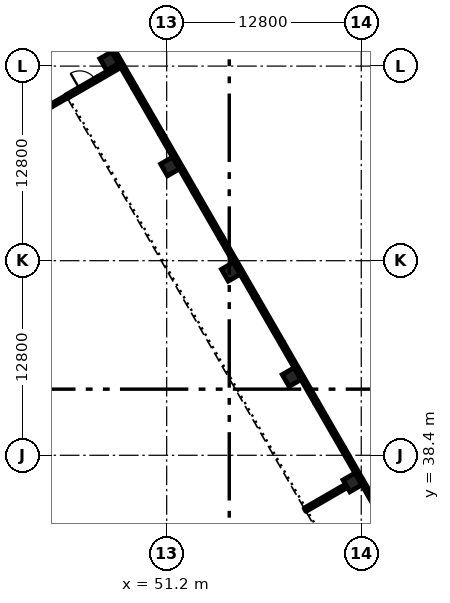
"""IFC4 building model, lengths in metres.
Left out: names, types, materials, properties, quantities, classifications, styles, units other than length and angle.
Written with IfcOpenShell. Run it as: python <this file> out.ifc"""

import sys

from ifc_helpers import new_model, si_unit, direction, frame, frame_2d, origin, origin_2d, place, context, subcontext, project, spatial, rectangle, extrude, element, fill, save


model = new_model("IFC4")
c1 = context("Model", 3, precision=1e-05, world=origin(), true_north=direction((0.0, 1.0)))
c2 = subcontext(c1, "Body", "Model", "MODEL_VIEW")
j1 = project(units=[si_unit("LENGTHUNIT", "METRE"), si_unit("PLANEANGLEUNIT", "RADIAN")], contexts=[c1])
p1 = place(None, origin())
s1 = spatial("IfcSite", under=j1, at=p1, CompositionType="ELEMENT")
p2 = place(p1, origin())
s2 = spatial("IfcBuilding", under=s1, at=p2, CompositionType="ELEMENT")
p3 = place(p2, frame((0.0, 0.0, 11.4)))
s3 = spatial("IfcBuildingStorey", under=s2, at=p3, CompositionType="ELEMENT", Elevation=11.4)
for number, where, z_axis, x_axis in (
    (1, (63.417, 36.614, 0.0), (0.0, 0.0, 1.0), (-0.5, 0.866, 0.0)),
    (2, (59.417, 43.542, 0.0), (0.0, 0.0, 1.0), (-0.5, 0.866, 0.0)),
    (3, (55.417, 50.47, 0.0), (0.0, 0.0, 1.0), (-0.5, 0.866, 0.0)),
    (4, (51.417, 57.399, 0.0), (0.0, 0.0, 1.0), (-0.5, 0.866, 0.0)),
    (5, (47.417, 64.327, 0.0), (0.0, 0.0, 1.0), (-0.5, 0.866, 0.0)),
):
    element("IfcColumn", number, at=place(p3, frame(where, z_axis=z_axis, x_axis=x_axis)), inside=s3, PredefinedType="COLUMN", context=c2, shape_type="SweptSolid", body=[
        extrude(rectangle(XDim=0.9, YDim=0.9, at=origin_2d()), origin(), (0.0, 0.0, 1.0), 4.8),
    ])
p4 = place(p2, frame((0.0, 0.0, 6.0)))
s4 = spatial("IfcBuildingStorey", under=s2, at=p4, CompositionType="ELEMENT", Elevation=6.0)
p5 = place(p4, frame((26.178, 15.114, 0.0), z_axis=(0.0, 0.0, 1.0), x_axis=(0.866025540551, 0.499999763114, 0.0)))
e6 = element("IfcWall", 6, at=p5, inside=s4, PredefinedType="SOLIDWALL", context=c2, shape_type="SweptSolid", body=[
    extrude(rectangle(XDim=39.4, YDim=0.25, at=frame_2d((19.7, 0.0))), origin(), (0.0, 0.0, 1.0), 10.2),
])
p6 = place(p3, frame((62.79, 38.85, 0.0), z_axis=(0.0, 0.0, 1.0), x_axis=(0.499990139034, -0.866031096941, 0.0)))
e7 = element("IfcWall", 7, at=p6, inside=s3, PredefinedType="SOLIDWALL", context=c2, shape_type="SweptSolid", body=[
    extrude(rectangle(XDim=4.5, YDim=0.25, at=frame_2d((2.25, 0.0))), origin(), (0.0, 0.0, 1.0), 4.5),
])
p7 = place(p3, frame((61.04, 41.881, 0.0), z_axis=(0.0, 0.0, 1.0), x_axis=(0.500010275428, -0.866019471182, 0.0)))
e8 = element("IfcWall", 8, at=p7, inside=s3, PredefinedType="SOLIDWALL", context=c2, shape_type="SweptSolid", body=[
    extrude(rectangle(XDim=3.5, YDim=0.25, at=frame_2d((1.75, 0.0))), origin(), (0.0, 0.0, 1.0), 4.5),
])
p8 = place(p7, frame((0.25, 0.0, 0.9)))
e9 = element("IfcOpeningElement", 9, at=p8, cuts=e8, PredefinedType="OPENING", context=c2, shape_type="SweptSolid", body=[
    extrude(rectangle(XDim=3.0, YDim=2.2, at=frame_2d((1.5, 1.1))), frame((0.0, 0.135, 0.0), z_axis=(0.0, -1.0, 0.0), x_axis=(1.0, 0.0, 0.0)), (0.0, 0.0, 1.0), 0.27),
])
p9 = place(p3, frame((58.79, 45.778, 0.0), z_axis=(0.0, 0.0, 1.0), x_axis=(0.499990139034, -0.866031096941, 0.0)))
e10 = element("IfcWall", 10, at=p9, inside=s3, PredefinedType="SOLIDWALL", context=c2, shape_type="SweptSolid", body=[
    extrude(rectangle(XDim=4.5, YDim=0.25, at=frame_2d((2.25, 0.0))), origin(), (0.0, 0.0, 1.0), 4.5),
])
p10 = place(p3, frame((57.04, 48.809, 0.0), z_axis=(0.0, 0.0, 1.0), x_axis=(0.500010275428, -0.866019471182, 0.0)))
e11 = element("IfcWall", 11, at=p10, inside=s3, PredefinedType="SOLIDWALL", context=c2, shape_type="SweptSolid", body=[
    extrude(rectangle(XDim=3.5, YDim=0.25, at=frame_2d((1.75, 0.0))), origin(), (0.0, 0.0, 1.0), 4.5),
])
p11 = place(p10, frame((0.25, 0.0, 0.9)))
e12 = element("IfcOpeningElement", 12, at=p11, cuts=e11, PredefinedType="OPENING", context=c2, shape_type="SweptSolid", body=[
    extrude(rectangle(XDim=3.0, YDim=2.2, at=frame_2d((1.5, 1.1))), frame((0.0, 0.135, 0.0), z_axis=(0.0, -1.0, 0.0), x_axis=(1.0, 0.0, 0.0)), (0.0, 0.0, 1.0), 0.27),
])
p12 = place(p3, frame((54.79, 52.707, 0.0), z_axis=(0.0, 0.0, 1.0), x_axis=(0.499990139034, -0.866031096941, 0.0)))
e13 = element("IfcWall", 13, at=p12, inside=s3, PredefinedType="SOLIDWALL", context=c2, shape_type="SweptSolid", body=[
    extrude(rectangle(XDim=4.5, YDim=0.25, at=frame_2d((2.25, 0.0))), origin(), (0.0, 0.0, 1.0), 4.5),
])
p13 = place(p3, frame((53.04, 55.738, 0.0), z_axis=(0.0, 0.0, 1.0), x_axis=(0.500010275428, -0.866019471182, 0.0)))
e14 = element("IfcWall", 14, at=p13, inside=s3, PredefinedType="SOLIDWALL", context=c2, shape_type="SweptSolid", body=[
    extrude(rectangle(XDim=3.5, YDim=0.25, at=frame_2d((1.75, 0.0))), origin(), (0.0, 0.0, 1.0), 4.5),
])
p14 = place(p13, frame((0.25, 0.0, 0.9)))
e15 = element("IfcOpeningElement", 15, at=p14, cuts=e14, PredefinedType="OPENING", context=c2, shape_type="SweptSolid", body=[
    extrude(rectangle(XDim=3.0, YDim=2.2, at=frame_2d((1.5, 1.1))), frame((0.0, 0.135, 0.0), z_axis=(0.0, -1.0, 0.0), x_axis=(1.0, 0.0, 0.0)), (0.0, 0.0, 1.0), 0.27),
])
p15 = place(p3, frame((50.821, 59.581, 0.0), z_axis=(0.0, 0.0, 1.0), x_axis=(0.499990705068, -0.866030770149, 0.0)))
e16 = element("IfcWall", 16, at=p15, inside=s3, PredefinedType="SOLIDWALL", context=c2, shape_type="SweptSolid", body=[
    extrude(rectangle(XDim=4.438, YDim=0.25, at=frame_2d((2.219, 0.0))), origin(), (0.0, 0.0, 1.0), 4.5),
])
p16 = place(p3, frame((49.071, 62.612, 0.0), z_axis=(0.0, 0.0, 1.0), x_axis=(0.500010275428, -0.866019471182, 0.0)))
e17 = element("IfcWall", 17, at=p16, inside=s3, PredefinedType="SOLIDWALL", context=c2, shape_type="SweptSolid", body=[
    extrude(rectangle(XDim=3.5, YDim=0.25, at=frame_2d((1.75, 0.0))), origin(), (0.0, 0.0, 1.0), 4.5),
])
p17 = place(p16, frame((0.25, 0.0, 0.9)))
e18 = element("IfcOpeningElement", 18, at=p17, cuts=e17, PredefinedType="OPENING", context=c2, shape_type="SweptSolid", body=[
    extrude(rectangle(XDim=3.0, YDim=2.2, at=frame_2d((1.5, 1.1))), frame((0.0, 0.135, 0.0), z_axis=(0.0, -1.0, 0.0), x_axis=(1.0, 0.0, 0.0)), (0.0, 0.0, 1.0), 0.27),
])
p18 = place(p3, frame((43.915, 71.542, 0.0), z_axis=(0.0, 0.0, 1.0), x_axis=(0.500001855621, -0.866024332438, 0.0)))
e19 = element("IfcWall", 19, at=p18, inside=s3, PredefinedType="SOLIDWALL", context=c2, shape_type="SweptSolid", body=[
    extrude(rectangle(XDim=10.312, YDim=0.25, at=frame_2d((5.156, 0.0))), origin(), (0.0, 0.0, 1.0), 4.5),
])
p19 = place(p3, frame((60.3, 34.814, 0.0), z_axis=(0.0, 0.0, 1.0), x_axis=(0.866035871367, 0.499981869177, 0.0)))
e20 = element("IfcWall", 20, at=p19, inside=s3, PredefinedType="SOLIDWALL", context=c2, shape_type="SweptSolid", body=[
    extrude(rectangle(XDim=3.15, YDim=0.25, at=frame_2d((1.575, 0.0))), origin(), (0.0, 0.0, 1.0), 3.9),
])
p20 = place(p3, frame((44.612, 61.986, 0.0), z_axis=(0.0, 0.0, 1.0), x_axis=(0.866014668023, 0.500018594424, 0.0)))
e21 = element("IfcWall", 21, at=p20, inside=s3, PredefinedType="SOLIDWALL", context=c2, shape_type="SweptSolid", body=[
    extrude(rectangle(XDim=2.45, YDim=0.25, at=frame_2d((1.225, 0.0))), origin(), (0.0, 0.0, 1.0), 3.9),
])
p21 = place(p20, frame((1.0, 0.0, 0.0)))
e22 = element("IfcOpeningElement", 22, at=p21, cuts=e21, PredefinedType="OPENING", context=c2, shape_type="SweptSolid", body=[
    extrude(rectangle(XDim=1.2, YDim=2.1, at=frame_2d((0.6, 1.05))), frame((0.0, 0.135, 0.0), z_axis=(0.0, -1.0, 0.0), x_axis=(1.0, 0.0, 0.0)), (0.0, 0.0, 1.0), 0.27),
])
p22 = place(p3, frame((46.734, 63.211, 0.0), z_axis=(0.0, 0.0, 1.0), x_axis=(0.866055983265, 0.499947031044, 0.0)))
e23 = element("IfcWall", 23, at=p22, inside=s3, PredefinedType="SOLIDWALL", context=c2, shape_type="SweptSolid", body=[
    extrude(rectangle(XDim=1.6, YDim=0.25, at=frame_2d((0.8, 0.0))), origin(), (0.0, 0.0, 1.0), 3.9),
])
p23 = place(p3, frame((10.491, 42.286, 0.0), z_axis=(0.0, 0.0, 1.0), x_axis=(0.866025540551, 0.499999763114, 0.0)))
e24 = element("IfcWall", 24, at=p23, inside=s3, PredefinedType="PARTITIONING", context=c2, shape_type="SweptSolid", body=[
    extrude(rectangle(XDim=39.4, YDim=0.2, at=frame_2d((19.7, 0.0))), origin(), (0.0, 0.0, 1.0), 3.9),
])
p24 = place(p8, origin())
e25 = element("IfcWindow", 25, at=p24, inside=s3, PartitioningType="SINGLE_PANEL", PredefinedType="WINDOW", context=c2, shape_type="SweptSolid", body=[
    extrude(rectangle(XDim=3.0, YDim=2.2, at=frame_2d((1.5, 1.1))), frame((0.0, 0.03, 0.0), z_axis=(0.0, -1.0, 0.0), x_axis=(1.0, 0.0, 0.0)), (0.0, 0.0, 1.0), 0.06),
])
fill(e9, e25)
p25 = place(p11, origin())
e26 = element("IfcWindow", 26, at=p25, inside=s3, PartitioningType="SINGLE_PANEL", PredefinedType="WINDOW", context=c2, shape_type="SweptSolid", body=[
    extrude(rectangle(XDim=3.0, YDim=2.2, at=frame_2d((1.5, 1.1))), frame((0.0, 0.03, 0.0), z_axis=(0.0, -1.0, 0.0), x_axis=(1.0, 0.0, 0.0)), (0.0, 0.0, 1.0), 0.06),
])
fill(e12, e26)
p26 = place(p14, origin())
e27 = element("IfcWindow", 27, at=p26, inside=s3, PartitioningType="SINGLE_PANEL", PredefinedType="WINDOW", context=c2, shape_type="SweptSolid", body=[
    extrude(rectangle(XDim=3.0, YDim=2.2, at=frame_2d((1.5, 1.1))), frame((0.0, 0.03, 0.0), z_axis=(0.0, -1.0, 0.0), x_axis=(1.0, 0.0, 0.0)), (0.0, 0.0, 1.0), 0.06),
])
fill(e15, e27)
p27 = place(p17, origin())
e28 = element("IfcWindow", 28, at=p27, inside=s3, PartitioningType="SINGLE_PANEL", PredefinedType="WINDOW", context=c2, shape_type="SweptSolid", body=[
    extrude(rectangle(XDim=3.0, YDim=2.2, at=frame_2d((1.5, 1.1))), frame((0.0, 0.03, 0.0), z_axis=(0.0, -1.0, 0.0), x_axis=(1.0, 0.0, 0.0)), (0.0, 0.0, 1.0), 0.06),
])
fill(e18, e28)
p28 = place(p21, origin())
e29 = element("IfcDoor", 29, at=p28, inside=s3, OperationType="SINGLE_SWING_LEFT", PredefinedType="DOOR", context=c2, shape_type="SweptSolid", body=[
    extrude(rectangle(XDim=1.2, YDim=2.1, at=frame_2d((0.6, 1.05))), frame((0.0, 0.025, 0.0), z_axis=(0.0, -1.0, 0.0), x_axis=(1.0, 0.0, 0.0)), (0.0, 0.0, 1.0), 0.05),
])
fill(e22, e29)
save(model, sys.argv[1])
